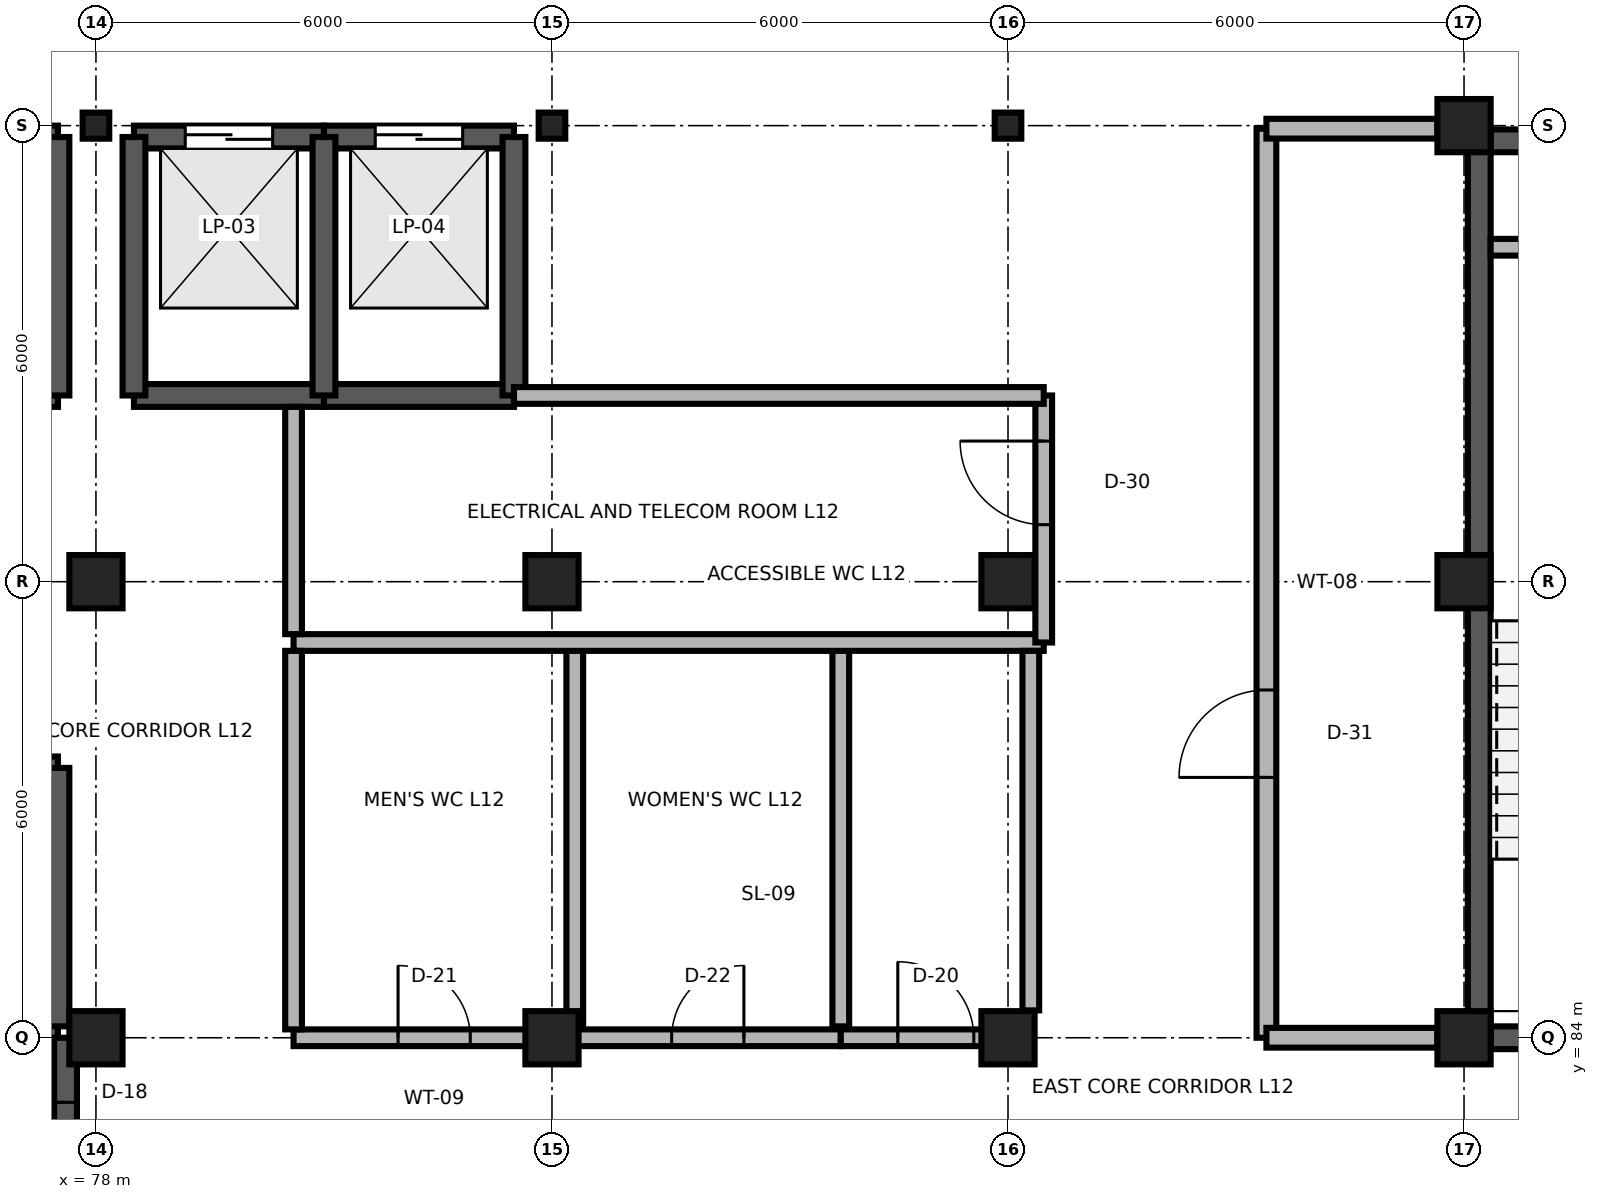
"""IFC4 building model, lengths in metres.
Left out: names, types, materials, properties, quantities, classifications, styles, units other than length and angle.
Written with IfcOpenShell. Run it as: python <this file> out.ifc"""

import sys

from ifc_helpers import new_model, si_unit, direction, frame, frame_2d, origin, origin_2d, place, context, subcontext, project, spatial, rectangle, i_section, extrude, element, fill, save


model = new_model("IFC4")
c1 = context("Model", 3, precision=1e-05, world=origin(), true_north=direction((0.0, 1.0)))
c2 = subcontext(c1, "Body", "Model", "MODEL_VIEW")
j1 = project(units=[si_unit("LENGTHUNIT", "METRE"), si_unit("PLANEANGLEUNIT", "RADIAN")], contexts=[c1])
p1 = place(None, origin())
s1 = spatial("IfcSite", under=j1, at=p1, CompositionType="ELEMENT")
p2 = place(p1, origin())
s2 = spatial("IfcBuilding", under=s1, at=p2, CompositionType="ELEMENT")
p3 = place(p2, frame((0.0, 0.0, 48.3)))
s3 = spatial("IfcBuildingStorey", under=s2, at=p3, CompositionType="ELEMENT", Elevation=48.3)
for number, where, z_axis, x_axis in (
    (1, (78.0, 84.0, 0.0), (0.0, 0.0, 1.0), (1.0, 0.0, 0.0)),
    (2, (84.0, 84.0, 0.0), (0.0, 0.0, 1.0), (1.0, 0.0, 0.0)),
    (3, (90.0, 84.0, 0.0), (0.0, 0.0, 1.0), (1.0, 0.0, 0.0)),
    (4, (96.0, 84.0, 0.0), (0.0, 0.0, 1.0), (1.0, 0.0, 0.0)),
    (5, (78.0, 90.0, 0.0), (0.0, 0.0, 1.0), (1.0, 0.0, 0.0)),
    (6, (84.0, 90.0, 0.0), (0.0, 0.0, 1.0), (1.0, 0.0, 0.0)),
    (7, (90.0, 90.0, 0.0), (0.0, 0.0, 1.0), (1.0, 0.0, 0.0)),
    (8, (96.0, 90.0, 0.0), (0.0, 0.0, 1.0), (1.0, 0.0, 0.0)),
):
    element("IfcColumn", number, at=place(p3, frame(where, z_axis=z_axis, x_axis=x_axis)), inside=s3, PredefinedType="COLUMN", context=c2, shape_type="SweptSolid", body=[
        extrude(rectangle(XDim=0.7, YDim=0.7, at=origin_2d()), origin(), (0.0, 0.0, 1.0), 3.9),
    ])
for number, where, z_axis, x_axis in (
    (9, (78.0, 96.0, 0.0), (0.0, 0.0, 1.0), (1.0, 0.0, 0.0)),
    (10, (84.0, 96.0, 0.0), (0.0, 0.0, 1.0), (1.0, 0.0, 0.0)),
    (11, (90.0, 96.0, 0.0), (0.0, 0.0, 1.0), (1.0, 0.0, 0.0)),
):
    element("IfcColumn", number, at=place(p3, frame(where, z_axis=z_axis, x_axis=x_axis)), inside=s3, PredefinedType="COLUMN", context=c2, shape_type="SweptSolid", body=[
        extrude(i_section(OverallWidth=0.35, OverallDepth=0.343, WebThickness=0.01, FlangeThickness=0.015, FilletRadius=0.02, at=origin_2d()), origin(), (0.0, 0.0, 1.0), 3.9),
    ])
p4 = place(p3, frame((96.0, 96.0, 0.0), z_axis=(0.0, 0.0, 1.0), x_axis=(1.0, 0.0, 0.0)))
e12 = element("IfcColumn", 12, at=p4, inside=s3, PredefinedType="COLUMN", context=c2, shape_type="SweptSolid", body=[
    extrude(rectangle(XDim=0.7, YDim=0.7, at=origin_2d()), origin(), (0.0, 0.0, 1.0), 3.9),
])
p5 = place(p3, frame((96.35, 84.0, 0.0), z_axis=(0.0, 0.0, 1.0), x_axis=(1.0, 0.0, 0.0)))
e13 = element("IfcWall", 13, at=p5, inside=s3, PredefinedType="SHEAR", context=c2, shape_type="SweptSolid", body=[
    extrude(rectangle(XDim=5.3, YDim=0.3, at=frame_2d((2.65, 0.0))), origin(), (0.0, 0.0, 1.0), 3.66),
])
p6 = place(p5, frame((1.975, 0.0, 0.0)))
e14 = element("IfcOpeningElement", 14, at=p6, cuts=e13, PredefinedType="OPENING", context=c2, shape_type="SweptSolid", body=[
    extrude(rectangle(XDim=1.35, YDim=2.2, at=frame_2d((0.675, 1.1))), frame((0.0, 0.165, 0.0), z_axis=(0.0, -1.0, 0.0), x_axis=(1.0, 0.0, 0.0)), (0.0, 0.0, 1.0), 0.33),
])
p7 = place(p3, frame((96.35, 95.8, 0.0), z_axis=(0.0, 0.0, 1.0), x_axis=(1.0, 0.0, 0.0)))
e15 = element("IfcWall", 15, at=p7, inside=s3, PredefinedType="SHEAR", context=c2, shape_type="SweptSolid", body=[
    extrude(rectangle(XDim=5.3, YDim=0.3, at=frame_2d((2.65, 0.0))), origin(), (0.0, 0.0, 1.0), 3.74),
])
p8 = place(p3, frame((96.2, 84.0, 0.0), z_axis=(0.0, 0.0, 1.0), x_axis=(0.0, 1.0, 0.0)))
e16 = element("IfcWall", 16, at=p8, inside=s3, PredefinedType="SHEAR", context=c2, shape_type="SweptSolid", body=[
    extrude(rectangle(XDim=11.8, YDim=0.3, at=frame_2d((5.9, 0.0))), origin(), (0.0, 0.0, 1.0), 3.74),
])
p9 = place(p3, frame((96.35, 94.4, 0.0), z_axis=(0.0, 0.0, 1.0), x_axis=(1.0, 0.0, 0.0)))
e17 = element("IfcWall", 17, at=p9, inside=s3, PredefinedType="PARTITIONING", context=c2, shape_type="SweptSolid", body=[
    extrude(rectangle(XDim=1.1, YDim=0.22, at=frame_2d((0.55, 0.0))), origin(), (0.0, 0.0, 1.0), 3.74),
])
p10 = place(p3, frame((75.0, 84.15, 0.0), z_axis=(0.0, 0.0, 1.0), x_axis=(1.0, 0.0, 0.0)))
e18 = element("IfcWall", 18, at=p10, inside=s3, PredefinedType="SHEAR", context=c2, shape_type="SweptSolid", body=[
    extrude(rectangle(XDim=2.5, YDim=0.3, at=frame_2d((1.25, 0.0))), origin(), (0.0, 0.0, 1.0), 3.74),
])
p11 = place(p10, frame((0.7, 0.0, 0.0)))
e19 = element("IfcOpeningElement", 19, at=p11, cuts=e18, PredefinedType="OPENING", context=c2, shape_type="SweptSolid", body=[
    extrude(rectangle(XDim=1.1, YDim=2.1, at=frame_2d((0.55, 1.05))), frame((0.0, 0.165, 0.0), z_axis=(0.0, -1.0, 0.0), x_axis=(1.0, 0.0, 0.0)), (0.0, 0.0, 1.0), 0.33),
])
p12 = place(p3, frame((75.0, 87.55, 0.0), z_axis=(0.0, 0.0, 1.0), x_axis=(1.0, 0.0, 0.0)))
e20 = element("IfcWall", 20, at=p12, inside=s3, PredefinedType="SHEAR", context=c2, shape_type="SweptSolid", body=[
    extrude(rectangle(XDim=2.5, YDim=0.3, at=frame_2d((1.25, 0.0))), origin(), (0.0, 0.0, 1.0), 3.74),
])
p13 = place(p3, frame((77.5, 84.15, 0.0), z_axis=(0.0, 0.0, 1.0), x_axis=(0.0, 1.0, 0.0)))
e21 = element("IfcWall", 21, at=p13, inside=s3, PredefinedType="SHEAR", context=c2, shape_type="SweptSolid", body=[
    extrude(rectangle(XDim=3.4, YDim=0.3, at=frame_2d((1.7, 0.0))), origin(), (0.0, 0.0, 1.0), 3.74),
])
p14 = place(p3, frame((75.0, 95.85, 0.0), z_axis=(0.0, 0.0, 1.0), x_axis=(1.0, 0.0, 0.0)))
e22 = element("IfcWall", 22, at=p14, inside=s3, PredefinedType="SHEAR", context=c2, shape_type="SweptSolid", body=[
    extrude(rectangle(XDim=2.5, YDim=0.3, at=frame_2d((1.25, 0.0))), origin(), (0.0, 0.0, 1.0), 3.74),
])
p15 = place(p14, frame((0.675, 0.0, 0.0)))
e23 = element("IfcOpeningElement", 23, at=p15, cuts=e22, PredefinedType="OPENING", context=c2, shape_type="SweptSolid", body=[
    extrude(rectangle(XDim=1.15, YDim=2.15, at=frame_2d((0.575, 1.075))), frame((0.0, 0.165, 0.0), z_axis=(0.0, -1.0, 0.0), x_axis=(1.0, 0.0, 0.0)), (0.0, 0.0, 1.0), 0.33),
])
p16 = place(p3, frame((75.0, 92.45, 0.0), z_axis=(0.0, 0.0, 1.0), x_axis=(1.0, 0.0, 0.0)))
e24 = element("IfcWall", 24, at=p16, inside=s3, PredefinedType="SHEAR", context=c2, shape_type="SweptSolid", body=[
    extrude(rectangle(XDim=2.5, YDim=0.3, at=frame_2d((1.25, 0.0))), origin(), (0.0, 0.0, 1.0), 3.74),
])
p17 = place(p3, frame((77.5, 92.45, 0.0), z_axis=(0.0, 0.0, 1.0), x_axis=(0.0, 1.0, 0.0)))
e25 = element("IfcWall", 25, at=p17, inside=s3, PredefinedType="SHEAR", context=c2, shape_type="SweptSolid", body=[
    extrude(rectangle(XDim=3.4, YDim=0.3, at=frame_2d((1.7, 0.0))), origin(), (0.0, 0.0, 1.0), 3.74),
])
p18 = place(p3, frame((78.5, 95.85, 0.0), z_axis=(0.0, 0.0, 1.0), x_axis=(1.0, 0.0, 0.0)))
e26 = element("IfcWall", 26, at=p18, inside=s3, PredefinedType="SHEAR", context=c2, shape_type="SweptSolid", body=[
    extrude(rectangle(XDim=2.5, YDim=0.3, at=frame_2d((1.25, 0.0))), origin(), (0.0, 0.0, 1.0), 3.74),
])
p19 = place(p18, frame((0.675, 0.0, 0.0)))
e27 = element("IfcOpeningElement", 27, at=p19, cuts=e26, PredefinedType="OPENING", context=c2, shape_type="SweptSolid", body=[
    extrude(rectangle(XDim=1.15, YDim=2.15, at=frame_2d((0.575, 1.075))), frame((0.0, 0.165, 0.0), z_axis=(0.0, -1.0, 0.0), x_axis=(1.0, 0.0, 0.0)), (0.0, 0.0, 1.0), 0.33),
])
p20 = place(p3, frame((78.5, 92.45, 0.0), z_axis=(0.0, 0.0, 1.0), x_axis=(1.0, 0.0, 0.0)))
e28 = element("IfcWall", 28, at=p20, inside=s3, PredefinedType="SHEAR", context=c2, shape_type="SweptSolid", body=[
    extrude(rectangle(XDim=2.5, YDim=0.3, at=frame_2d((1.25, 0.0))), origin(), (0.0, 0.0, 1.0), 3.74),
])
p21 = place(p3, frame((78.5, 92.45, 0.0), z_axis=(0.0, 0.0, 1.0), x_axis=(0.0, 1.0, 0.0)))
e29 = element("IfcWall", 29, at=p21, inside=s3, PredefinedType="SHEAR", context=c2, shape_type="SweptSolid", body=[
    extrude(rectangle(XDim=3.4, YDim=0.3, at=frame_2d((1.7, 0.0))), origin(), (0.0, 0.0, 1.0), 3.74),
])
p22 = place(p3, frame((81.0, 95.85, 0.0), z_axis=(0.0, 0.0, 1.0), x_axis=(1.0, 0.0, 0.0)))
e30 = element("IfcWall", 30, at=p22, inside=s3, PredefinedType="SHEAR", context=c2, shape_type="SweptSolid", body=[
    extrude(rectangle(XDim=2.5, YDim=0.3, at=frame_2d((1.25, 0.0))), origin(), (0.0, 0.0, 1.0), 3.74),
])
p23 = place(p22, frame((0.675, 0.0, 0.0)))
e31 = element("IfcOpeningElement", 31, at=p23, cuts=e30, PredefinedType="OPENING", context=c2, shape_type="SweptSolid", body=[
    extrude(rectangle(XDim=1.15, YDim=2.15, at=frame_2d((0.575, 1.075))), frame((0.0, 0.165, 0.0), z_axis=(0.0, -1.0, 0.0), x_axis=(1.0, 0.0, 0.0)), (0.0, 0.0, 1.0), 0.33),
])
p24 = place(p3, frame((81.0, 92.45, 0.0), z_axis=(0.0, 0.0, 1.0), x_axis=(1.0, 0.0, 0.0)))
e32 = element("IfcWall", 32, at=p24, inside=s3, PredefinedType="SHEAR", context=c2, shape_type="SweptSolid", body=[
    extrude(rectangle(XDim=2.5, YDim=0.3, at=frame_2d((1.25, 0.0))), origin(), (0.0, 0.0, 1.0), 3.74),
])
for number, where, z_axis, x_axis in (
    (33, (81.0, 92.45, 0.0), (0.0, 0.0, 1.0), (0.0, 1.0, 0.0)),
    (34, (83.5, 92.45, 0.0), (0.0, 0.0, 1.0), (0.0, 1.0, 0.0)),
):
    element("IfcWall", number, at=place(p3, frame(where, z_axis=z_axis, x_axis=x_axis)), inside=s3, PredefinedType="SHEAR", context=c2, shape_type="SweptSolid", body=[
        extrude(rectangle(XDim=3.4, YDim=0.3, at=frame_2d((1.7, 0.0))), origin(), (0.0, 0.0, 1.0), 3.74),
    ])
p25 = place(p3, frame((93.4, 84.0, 0.0), z_axis=(0.0, 0.0, 1.0), x_axis=(0.0, 1.0, 0.0)))
e35 = element("IfcWall", 35, at=p25, inside=s3, PredefinedType="PARTITIONING", context=c2, shape_type="SweptSolid", body=[
    extrude(rectangle(XDim=11.96, YDim=0.26, at=frame_2d((5.98, 0.0))), origin(), (0.0, 0.0, 1.0), 3.68),
])
p26 = place(p25, frame((3.425, 0.0, 0.0)))
e36 = element("IfcOpeningElement", 36, at=p26, cuts=e35, PredefinedType="OPENING", context=c2, shape_type="SweptSolid", body=[
    extrude(rectangle(XDim=1.15, YDim=2.2, at=frame_2d((0.575, 1.1))), frame((0.0, 0.145, 0.0), z_axis=(0.0, -1.0, 0.0), x_axis=(1.0, 0.0, 0.0)), (0.0, 0.0, 1.0), 0.29),
])
for number, where, z_axis, x_axis in (
    (37, (93.4, 84.0, 0.0), (0.0, 0.0, 1.0), (1.0, 0.0, 0.0)),
    (38, (93.4, 95.96, 0.0), (0.0, 0.0, 1.0), (1.0, 0.0, 0.0)),
):
    element("IfcWall", number, at=place(p3, frame(where, z_axis=z_axis, x_axis=x_axis)), inside=s3, PredefinedType="PARTITIONING", context=c2, shape_type="SweptSolid", body=[
        extrude(rectangle(XDim=2.25, YDim=0.26, at=frame_2d((1.125, 0.0))), origin(), (0.0, 0.0, 1.0), 3.288),
    ])
p27 = place(p3, frame((77.6, 81.0, 0.0), z_axis=(0.0, 0.0, 1.0), x_axis=(0.0, 1.0, 0.0)))
e39 = element("IfcWall", 39, at=p27, inside=s3, PredefinedType="SHEAR", context=c2, shape_type="SweptSolid", body=[
    extrude(rectangle(XDim=3.0, YDim=0.3, at=frame_2d((1.5, 0.0))), origin(), (0.0, 0.0, 1.0), 3.68),
])
p28 = place(p27, frame((0.85, 0.0, 0.0)))
e40 = element("IfcOpeningElement", 40, at=p28, cuts=e39, PredefinedType="OPENING", context=c2, shape_type="SweptSolid", body=[
    extrude(rectangle(XDim=1.3, YDim=2.2, at=frame_2d((0.65, 1.1))), frame((0.0, 0.165, 0.0), z_axis=(0.0, -1.0, 0.0), x_axis=(1.0, 0.0, 0.0)), (0.0, 0.0, 1.0), 0.33),
])
p29 = place(p3, frame((80.6, 84.0, 0.0), z_axis=(0.0, 0.0, 1.0), x_axis=(1.0, 0.0, 0.0)))
e41 = element("IfcWall", 41, at=p29, inside=s3, PredefinedType="PARTITIONING", context=c2, shape_type="SweptSolid", body=[
    extrude(rectangle(XDim=3.7, YDim=0.22, at=frame_2d((1.85, 0.0))), origin(), (0.0, 0.0, 1.0), 3.288),
])
p30 = place(p29, frame((1.375, 0.0, 0.0)))
e42 = element("IfcOpeningElement", 42, at=p30, cuts=e41, PredefinedType="OPENING", context=c2, shape_type="SweptSolid", body=[
    extrude(rectangle(XDim=0.95, YDim=2.15, at=frame_2d((0.475, 1.075))), frame((0.0, 0.125, 0.0), z_axis=(0.0, -1.0, 0.0), x_axis=(1.0, 0.0, 0.0)), (0.0, 0.0, 1.0), 0.25),
])
p31 = place(p3, frame((84.3, 84.0, 0.0), z_axis=(0.0, 0.0, 1.0), x_axis=(1.0, 0.0, 0.0)))
e43 = element("IfcWall", 43, at=p31, inside=s3, PredefinedType="PARTITIONING", context=c2, shape_type="SweptSolid", body=[
    extrude(rectangle(XDim=3.5, YDim=0.22, at=frame_2d((1.75, 0.0))), origin(), (0.0, 0.0, 1.0), 3.288),
])
p32 = place(p31, frame((1.275, 0.0, 0.0)))
e44 = element("IfcOpeningElement", 44, at=p32, cuts=e43, PredefinedType="OPENING", context=c2, shape_type="SweptSolid", body=[
    extrude(rectangle(XDim=0.95, YDim=2.1, at=frame_2d((0.475, 1.05))), frame((0.0, 0.125, 0.0), z_axis=(0.0, -1.0, 0.0), x_axis=(1.0, 0.0, 0.0)), (0.0, 0.0, 1.0), 0.25),
])
p33 = place(p3, frame((87.8, 84.0, 0.0), z_axis=(0.0, 0.0, 1.0), x_axis=(1.0, 0.0, 0.0)))
e45 = element("IfcWall", 45, at=p33, inside=s3, PredefinedType="PARTITIONING", context=c2, shape_type="SweptSolid", body=[
    extrude(rectangle(XDim=2.5, YDim=0.22, at=frame_2d((1.25, 0.0))), origin(), (0.0, 0.0, 1.0), 3.288),
])
p34 = place(p33, frame((0.75, 0.0, 0.0)))
e46 = element("IfcOpeningElement", 46, at=p34, cuts=e45, PredefinedType="OPENING", context=c2, shape_type="SweptSolid", body=[
    extrude(rectangle(XDim=1.0, YDim=2.15, at=frame_2d((0.5, 1.075))), frame((0.0, 0.125, 0.0), z_axis=(0.0, -1.0, 0.0), x_axis=(1.0, 0.0, 0.0)), (0.0, 0.0, 1.0), 0.25),
])
for number, where, z_axis, x_axis in (
    (47, (84.3, 84.15, 0.0), (0.0, 0.0, 1.0), (0.0, 1.0, 0.0)),
    (48, (87.8, 84.15, 0.0), (0.0, 0.0, 1.0), (0.0, 1.0, 0.0)),
):
    element("IfcWall", number, at=place(p3, frame(where, z_axis=z_axis, x_axis=x_axis)), inside=s3, PredefinedType="PARTITIONING", context=c2, shape_type="SweptSolid", body=[
        extrude(rectangle(XDim=5.0, YDim=0.22, at=frame_2d((2.5, 0.0))), origin(), (0.0, 0.0, 1.0), 3.68),
    ])
p35 = place(p3, frame((80.6, 89.2, 0.0), z_axis=(0.0, 0.0, 1.0), x_axis=(1.0, 0.0, 0.0)))
e49 = element("IfcWall", 49, at=p35, inside=s3, PredefinedType="PARTITIONING", context=c2, shape_type="SweptSolid", body=[
    extrude(rectangle(XDim=9.87, YDim=0.22, at=frame_2d((4.935, 0.0))), origin(), (0.0, 0.0, 1.0), 3.68),
])
p36 = place(p3, frame((90.47, 89.2, 0.0), z_axis=(0.0, 0.0, 1.0), x_axis=(0.0, 1.0, 0.0)))
e50 = element("IfcWall", 50, at=p36, inside=s3, PredefinedType="PARTITIONING", context=c2, shape_type="SweptSolid", body=[
    extrude(rectangle(XDim=3.25, YDim=0.22, at=frame_2d((1.625, 0.0))), origin(), (0.0, 0.0, 1.0), 3.68),
])
p37 = place(p36, frame((1.55, 0.0, 0.0)))
e51 = element("IfcOpeningElement", 51, at=p37, cuts=e50, PredefinedType="OPENING", context=c2, shape_type="SweptSolid", body=[
    extrude(rectangle(XDim=1.1, YDim=2.15, at=frame_2d((0.55, 1.075))), frame((0.0, 0.125, 0.0), z_axis=(0.0, -1.0, 0.0), x_axis=(1.0, 0.0, 0.0)), (0.0, 0.0, 1.0), 0.25),
])
p38 = place(p3, frame((80.6, 84.11, 0.0), z_axis=(0.0, 0.0, 1.0), x_axis=(0.0, 1.0, 0.0)))
e52 = element("IfcWall", 52, at=p38, inside=s3, PredefinedType="PARTITIONING", context=c2, shape_type="SweptSolid", body=[
    extrude(rectangle(XDim=4.98, YDim=0.22, at=frame_2d((2.49, 0.0))), origin(), (0.0, 0.0, 1.0), 3.68),
])
p39 = place(p3, frame((90.3, 84.36, 0.0), z_axis=(0.0, 0.0, 1.0), x_axis=(0.0, 1.0, 0.0)))
e53 = element("IfcWall", 53, at=p39, inside=s3, PredefinedType="PARTITIONING", context=c2, shape_type="SweptSolid", body=[
    extrude(rectangle(XDim=4.73, YDim=0.22, at=frame_2d((2.365, 0.0))), origin(), (0.0, 0.0, 1.0), 3.68),
])
p40 = place(p3, frame((80.6, 89.31, 0.0), z_axis=(0.0, 0.0, 1.0), x_axis=(0.0, 1.0, 0.0)))
e54 = element("IfcWall", 54, at=p40, inside=s3, PredefinedType="PARTITIONING", context=c2, shape_type="SweptSolid", body=[
    extrude(rectangle(XDim=2.99, YDim=0.22, at=frame_2d((1.495, 0.0))), origin(), (0.0, 0.0, 1.0), 3.68),
])
p41 = place(p3, frame((83.5, 92.45, 0.0), z_axis=(0.0, 0.0, 1.0), x_axis=(1.0, 0.0, 0.0)))
e55 = element("IfcWall", 55, at=p41, inside=s3, PredefinedType="PARTITIONING", context=c2, shape_type="SweptSolid", body=[
    extrude(rectangle(XDim=6.97, YDim=0.22, at=frame_2d((3.485, 0.0))), origin(), (0.0, 0.0, 1.0), 3.68),
])
p42 = place(p19, origin())
e56 = element("IfcDoor", 56, at=p42, inside=s3, OperationType="DOUBLE_DOOR_SLIDING", PredefinedType="DOOR", context=c2, shape_type="SweptSolid", body=[
    extrude(rectangle(XDim=1.15, YDim=2.15, at=frame_2d((0.575, 1.075))), frame((0.0, 0.025, 0.0), z_axis=(0.0, -1.0, 0.0), x_axis=(1.0, 0.0, 0.0)), (0.0, 0.0, 1.0), 0.05),
])
fill(e27, e56)
p43 = place(p23, origin())
e57 = element("IfcDoor", 57, at=p43, inside=s3, OperationType="DOUBLE_DOOR_SLIDING", PredefinedType="DOOR", context=c2, shape_type="SweptSolid", body=[
    extrude(rectangle(XDim=1.15, YDim=2.15, at=frame_2d((0.575, 1.075))), frame((0.0, 0.025, 0.0), z_axis=(0.0, -1.0, 0.0), x_axis=(1.0, 0.0, 0.0)), (0.0, 0.0, 1.0), 0.05),
])
fill(e31, e57)
p44 = place(p26, origin())
e58 = element("IfcDoor", 58, at=p44, inside=s3, OperationType="SINGLE_SWING_LEFT", PredefinedType="DOOR", context=c2, shape_type="SweptSolid", body=[
    extrude(rectangle(XDim=1.15, YDim=2.2, at=frame_2d((0.575, 1.1))), frame((0.0, 0.025, 0.0), z_axis=(0.0, -1.0, 0.0), x_axis=(1.0, 0.0, 0.0)), (0.0, 0.0, 1.0), 0.05),
])
fill(e36, e58)
p45 = place(p28, origin())
e59 = element("IfcDoor", 59, at=p45, inside=s3, OperationType="SINGLE_SWING_RIGHT", PredefinedType="DOOR", context=c2, shape_type="SweptSolid", body=[
    extrude(rectangle(XDim=1.3, YDim=2.2, at=frame_2d((0.65, 1.1))), frame((0.0, 0.025, 0.0), z_axis=(0.0, -1.0, 0.0), x_axis=(1.0, 0.0, 0.0)), (0.0, 0.0, 1.0), 0.05),
])
fill(e40, e59)
p46 = place(p30, origin())
e60 = element("IfcDoor", 60, at=p46, inside=s3, OperationType="SINGLE_SWING_LEFT", PredefinedType="DOOR", context=c2, shape_type="SweptSolid", body=[
    extrude(rectangle(XDim=0.95, YDim=2.15, at=frame_2d((0.475, 1.075))), frame((0.0, 0.025, 0.0), z_axis=(0.0, -1.0, 0.0), x_axis=(1.0, 0.0, 0.0)), (0.0, 0.0, 1.0), 0.05),
])
fill(e42, e60)
p47 = place(p32, origin())
e61 = element("IfcDoor", 61, at=p47, inside=s3, OperationType="SINGLE_SWING_RIGHT", PredefinedType="DOOR", context=c2, shape_type="SweptSolid", body=[
    extrude(rectangle(XDim=0.95, YDim=2.1, at=frame_2d((0.475, 1.05))), frame((0.0, 0.025, 0.0), z_axis=(0.0, -1.0, 0.0), x_axis=(1.0, 0.0, 0.0)), (0.0, 0.0, 1.0), 0.05),
])
fill(e44, e61)
p48 = place(p34, origin())
e62 = element("IfcDoor", 62, at=p48, inside=s3, OperationType="SINGLE_SWING_LEFT", PredefinedType="DOOR", context=c2, shape_type="SweptSolid", body=[
    extrude(rectangle(XDim=1.0, YDim=2.15, at=frame_2d((0.5, 1.075))), frame((0.0, 0.025, 0.0), z_axis=(0.0, -1.0, 0.0), x_axis=(1.0, 0.0, 0.0)), (0.0, 0.0, 1.0), 0.05),
])
fill(e46, e62)
p49 = place(p37, origin())
e63 = element("IfcDoor", 63, at=p49, inside=s3, OperationType="SINGLE_SWING_RIGHT", PredefinedType="DOOR", context=c2, shape_type="SweptSolid", body=[
    extrude(rectangle(XDim=1.1, YDim=2.15, at=frame_2d((0.55, 1.075))), frame((0.0, 0.025, 0.0), z_axis=(0.0, -1.0, 0.0), x_axis=(1.0, 0.0, 0.0)), (0.0, 0.0, 1.0), 0.05),
])
fill(e51, e63)
save(model, sys.argv[1])
